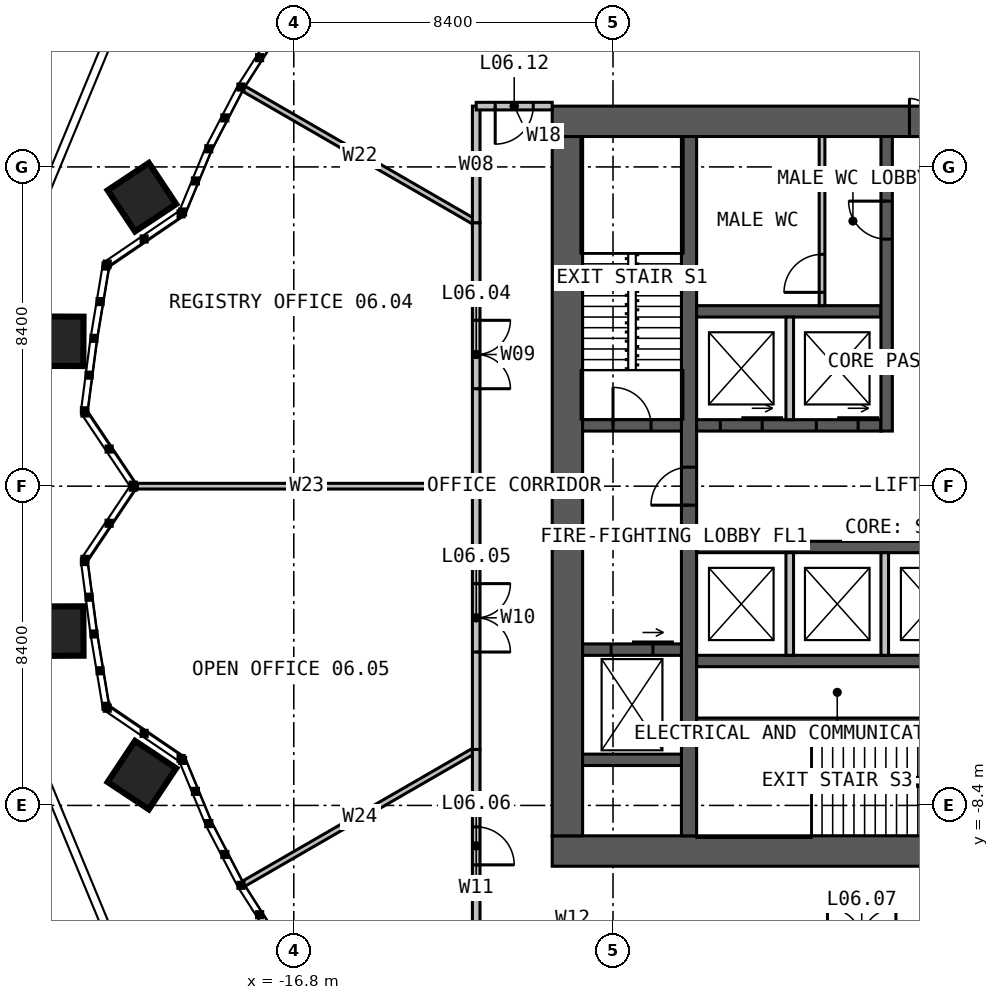
"""IFC4 building model, lengths in metres.
Left out: names, types, materials, properties, quantities, classifications, styles, units other than length and angle.
Written with IfcOpenShell. Run it as: python <this file> out.ifc"""

import sys

from ifc_helpers import new_model, si_unit, direction, frame, frame_2d, origin, place, context, subcontext, project, spatial, rectangle, extrude, element, fill, save


model = new_model("IFC4")
c1 = context("Model", 3, precision=1e-05, world=origin(), true_north=direction((0.0, 1.0)))
c2 = subcontext(c1, "Body", "Model", "MODEL_VIEW")
j1 = project(units=[si_unit("LENGTHUNIT", "METRE"), si_unit("PLANEANGLEUNIT", "RADIAN")], contexts=[c1])
p1 = place(None, origin())
s1 = spatial("IfcSite", under=j1, at=p1, CompositionType="ELEMENT")
p2 = place(p1, origin())
s2 = spatial("IfcBuilding", under=s1, at=p2, CompositionType="ELEMENT")
p3 = place(p2, frame((0.0, 0.0, 29.0)))
s3 = spatial("IfcBuildingStorey", under=s2, at=p3, CompositionType="ELEMENT", Elevation=29.0)
p4 = place(p3, frame((-10.0, 9.6, 0.0), z_axis=(0.0, 0.0, 1.0), x_axis=(1.0, 0.0, 0.0)))
e1 = element("IfcWall", 1, at=p4, inside=s3, PredefinedType="SOLIDWALL", context=c2, shape_type="SweptSolid", body=[
    extrude(rectangle(XDim=20.0, YDim=0.8, at=frame_2d((10.0, 0.0))), origin(), (0.0, 0.0, 1.0), 4.0),
])
p5 = place(p4, frame((9.4, 0.0, 0.0)))
e2 = element("IfcOpeningElement", 2, at=p5, cuts=e1, PredefinedType="OPENING", context=c2, shape_type="SweptSolid", body=[
    extrude(rectangle(XDim=1.2, YDim=2.2, at=frame_2d((0.6, 1.1))), frame((0.0, 0.41, 0.0), z_axis=(0.0, -1.0, 0.0), x_axis=(1.0, 0.0, 0.0)), (0.0, 0.0, 1.0), 0.82),
])
p6 = place(p3, frame((10.0, -9.6, 0.0), z_axis=(0.0, 0.0, 1.0), x_axis=(-1.0, 0.0, 0.0)))
e3 = element("IfcWall", 3, at=p6, inside=s3, PredefinedType="SOLIDWALL", context=c2, shape_type="SweptSolid", body=[
    extrude(rectangle(XDim=20.0, YDim=0.8, at=frame_2d((10.0, 0.0))), origin(), (0.0, 0.0, 1.0), 4.0),
])
p7 = place(p6, frame((6.875, 0.0, 0.0)))
e4 = element("IfcOpeningElement", 4, at=p7, cuts=e3, PredefinedType="OPENING", context=c2, shape_type="SweptSolid", body=[
    extrude(rectangle(XDim=1.2, YDim=2.2, at=frame_2d((0.6, 1.1))), frame((0.0, 0.41, 0.0), z_axis=(0.0, -1.0, 0.0), x_axis=(1.0, 0.0, 0.0)), (0.0, 0.0, 1.0), 0.82),
])
p8 = place(p3, frame((-9.6, 9.2, 0.0), z_axis=(0.0, 0.0, 1.0), x_axis=(0.0, -1.0, 0.0)))
e5 = element("IfcWall", 5, at=p8, inside=s3, PredefinedType="SOLIDWALL", context=c2, shape_type="SweptSolid", body=[
    extrude(rectangle(XDim=18.4, YDim=0.8, at=frame_2d((9.2, 0.0))), origin(), (0.0, 0.0, 1.0), 4.0),
])
p9 = place(p3, frame((-6.4, -9.2, 0.0), z_axis=(0.0, 0.0, 1.0), x_axis=(0.0, 1.0, 0.0)))
e6 = element("IfcWall", 6, at=p9, inside=s3, PredefinedType="SOLIDWALL", context=c2, shape_type="SweptSolid", body=[
    extrude(rectangle(XDim=18.4, YDim=0.4, at=frame_2d((9.2, 0.0))), origin(), (0.0, 0.0, 1.0), 4.0),
])
p10 = place(p9, frame((8.7, 0.0, 0.0)))
e7 = element("IfcOpeningElement", 7, at=p10, cuts=e6, PredefinedType="OPENING", context=c2, shape_type="SweptSolid", body=[
    extrude(rectangle(XDim=1.0, YDim=2.2, at=frame_2d((0.5, 1.1))), frame((0.0, 0.21, 0.0), z_axis=(0.0, -1.0, 0.0), x_axis=(1.0, 0.0, 0.0)), (0.0, 0.0, 1.0), 0.42),
])
p11 = place(p3, frame((-6.2, 1.6, 0.0), z_axis=(0.0, 0.0, 1.0), x_axis=(1.0, 0.0, 0.0)))
e8 = element("IfcWall", 8, at=p11, inside=s3, PredefinedType="SOLIDWALL", context=c2, shape_type="SweptSolid", body=[
    extrude(rectangle(XDim=4.85, YDim=0.3, at=frame_2d((2.425, 0.0))), origin(), (0.0, 0.0, 1.0), 4.0),
])
p12 = place(p11, frame((0.625, 0.0, 0.0)))
e9 = element("IfcOpeningElement", 9, at=p12, cuts=e8, PredefinedType="OPENING", context=c2, shape_type="SweptSolid", body=[
    extrude(rectangle(XDim=1.1, YDim=2.2, at=frame_2d((0.55, 1.1))), frame((0.0, 0.16, 0.0), z_axis=(0.0, -1.0, 0.0), x_axis=(1.0, 0.0, 0.0)), (0.0, 0.0, 1.0), 0.32),
])
p13 = place(p11, frame((3.15, 0.0, 0.0)))
e10 = element("IfcOpeningElement", 10, at=p13, cuts=e8, PredefinedType="OPENING", context=c2, shape_type="SweptSolid", body=[
    extrude(rectangle(XDim=1.1, YDim=2.2, at=frame_2d((0.55, 1.1))), frame((0.0, 0.16, 0.0), z_axis=(0.0, -1.0, 0.0), x_axis=(1.0, 0.0, 0.0)), (0.0, 0.0, 1.0), 0.32),
])
p14 = place(p3, frame((-6.2, 4.6, 0.0), z_axis=(0.0, 0.0, 1.0), x_axis=(1.0, 0.0, 0.0)))
e11 = element("IfcWall", 11, at=p14, inside=s3, PredefinedType="SOLIDWALL", context=c2, shape_type="SweptSolid", body=[
    extrude(rectangle(XDim=4.85, YDim=0.3, at=frame_2d((2.425, 0.0))), origin(), (0.0, 0.0, 1.0), 4.0),
])
p15 = place(p3, frame((-1.2, 1.45, 0.0), z_axis=(0.0, 0.0, 1.0), x_axis=(0.0, 1.0, 0.0)))
e12 = element("IfcWall", 12, at=p15, inside=s3, PredefinedType="SOLIDWALL", context=c2, shape_type="SweptSolid", body=[
    extrude(rectangle(XDim=7.75, YDim=0.3, at=frame_2d((3.875, 0.0))), origin(), (0.0, 0.0, 1.0), 4.0),
])
p16 = place(p15, frame((5.05, 0.0, 0.0)))
e13 = element("IfcOpeningElement", 13, at=p16, cuts=e12, PredefinedType="OPENING", context=c2, shape_type="SweptSolid", body=[
    extrude(rectangle(XDim=1.0, YDim=2.2, at=frame_2d((0.5, 1.1))), frame((0.0, 0.16, 0.0), z_axis=(0.0, -1.0, 0.0), x_axis=(1.0, 0.0, 0.0)), (0.0, 0.0, 1.0), 0.32),
])
for number, where, z_axis, x_axis in (
    (14, (-6.2, -1.6, 0.0), (0.0, 0.0, 1.0), (1.0, 0.0, 0.0)),
    (15, (-6.2, -4.6, 0.0), (0.0, 0.0, 1.0), (1.0, 0.0, 0.0)),
):
    element("IfcWall", number, at=place(p3, frame(where, z_axis=z_axis, x_axis=x_axis)), inside=s3, PredefinedType="SOLIDWALL", context=c2, shape_type="SweptSolid", body=[
        extrude(rectangle(XDim=7.4, YDim=0.3, at=frame_2d((3.7, 0.0))), origin(), (0.0, 0.0, 1.0), 4.0),
    ])
p17 = place(p3, frame((-6.2, -6.2, 0.0), z_axis=(0.0, 0.0, 1.0), x_axis=(1.0, 0.0, 0.0)))
e16 = element("IfcWall", 16, at=p17, inside=s3, PredefinedType="SOLIDWALL", context=c2, shape_type="SweptSolid", body=[
    extrude(rectangle(XDim=7.4, YDim=0.2, at=frame_2d((3.7, 0.0))), origin(), (0.0, 0.0, 1.0), 4.0),
])
p18 = place(p3, frame((-9.2, 1.6, 0.0), z_axis=(0.0, 0.0, 1.0), x_axis=(1.0, 0.0, 0.0)))
e17 = element("IfcWall", 17, at=p18, inside=s3, PredefinedType="SOLIDWALL", context=c2, shape_type="SweptSolid", body=[
    extrude(rectangle(XDim=2.6, YDim=0.3, at=frame_2d((1.3, 0.0))), origin(), (0.0, 0.0, 1.0), 4.0),
])
p19 = place(p18, frame((0.8, 0.0, 0.0)))
e18 = element("IfcOpeningElement", 18, at=p19, cuts=e17, PredefinedType="OPENING", context=c2, shape_type="SweptSolid", body=[
    extrude(rectangle(XDim=1.0, YDim=2.2, at=frame_2d((0.5, 1.1))), frame((0.0, 0.16, 0.0), z_axis=(0.0, -1.0, 0.0), x_axis=(1.0, 0.0, 0.0)), (0.0, 0.0, 1.0), 0.32),
])
p20 = place(p3, frame((-9.2, -4.3, 0.0), z_axis=(0.0, 0.0, 1.0), x_axis=(1.0, 0.0, 0.0)))
e19 = element("IfcWall", 19, at=p20, inside=s3, PredefinedType="SOLIDWALL", context=c2, shape_type="SweptSolid", body=[
    extrude(rectangle(XDim=2.6, YDim=0.3, at=frame_2d((1.3, 0.0))), origin(), (0.0, 0.0, 1.0), 4.0),
])
p21 = place(p20, frame((0.75, 0.0, 0.0)))
e20 = element("IfcOpeningElement", 20, at=p21, cuts=e19, PredefinedType="OPENING", context=c2, shape_type="SweptSolid", body=[
    extrude(rectangle(XDim=1.1, YDim=2.2, at=frame_2d((0.55, 1.1))), frame((0.0, 0.16, 0.0), z_axis=(0.0, -1.0, 0.0), x_axis=(1.0, 0.0, 0.0)), (0.0, 0.0, 1.0), 0.32),
])
p22 = place(p3, frame((-9.2, -7.2, 0.0), z_axis=(0.0, 0.0, 1.0), x_axis=(1.0, 0.0, 0.0)))
e21 = element("IfcWall", 21, at=p22, inside=s3, PredefinedType="SOLIDWALL", context=c2, shape_type="SweptSolid", body=[
    extrude(rectangle(XDim=2.6, YDim=0.3, at=frame_2d((1.3, 0.0))), origin(), (0.0, 0.0, 1.0), 4.0),
])
for number, where, z_axis, x_axis in (
    (22, (-3.75, 1.75, 0.0), (0.0, 0.0, 1.0), (0.0, 1.0, 0.0)),
    (23, (-3.75, -1.75, 0.0), (0.0, 0.0, 1.0), (0.0, -1.0, 0.0)),
    (24, (-1.25, -1.75, 0.0), (0.0, 0.0, 1.0), (0.0, -1.0, 0.0)),
):
    element("IfcWall", number, at=place(p3, frame(where, z_axis=z_axis, x_axis=x_axis)), inside=s3, PredefinedType="SOLIDWALL", context=c2, shape_type="SweptSolid", body=[
        extrude(rectangle(XDim=2.7, YDim=0.2, at=frame_2d((1.35, 0.0))), origin(), (0.0, 0.0, 1.0), 3.75),
    ])
p23 = place(p3, frame((-2.9, 4.75, 0.0), z_axis=(0.0, 0.0, 1.0), x_axis=(0.0, 1.0, 0.0)))
e25 = element("IfcWall", 25, at=p23, inside=s3, PredefinedType="PARTITIONING", context=c2, shape_type="SweptSolid", body=[
    extrude(rectangle(XDim=4.45, YDim=0.15, at=frame_2d((2.225, 0.0))), origin(), (0.0, 0.0, 1.0), 3.75),
])
p24 = place(p23, frame((0.35, 0.0, 0.0)))
e26 = element("IfcOpeningElement", 26, at=p24, cuts=e25, PredefinedType="OPENING", context=c2, shape_type="SweptSolid", body=[
    extrude(rectangle(XDim=1.0, YDim=2.2, at=frame_2d((0.5, 1.1))), frame((0.0, 0.085, 0.0), z_axis=(0.0, -1.0, 0.0), x_axis=(1.0, 0.0, 0.0)), (0.0, 0.0, 1.0), 0.17),
])
p25 = place(p3, frame((-12.0, 6.928, 0.0), z_axis=(0.0, 0.0, 1.0), x_axis=(-0.86602254688, 0.500004948271, 0.0)))
e27 = element("IfcWall", 27, at=p25, inside=s3, PredefinedType="PARTITIONING", context=c2, shape_type="SweptSolid", body=[
    extrude(rectangle(XDim=7.057, YDim=0.15, at=frame_2d((3.529, 0.0))), origin(), (0.0, 0.0, 1.0), 2.79),
])
p26 = place(p3, frame((-12.0, 0.0, 0.0), z_axis=(0.0, 0.0, 1.0), x_axis=(-1.0, 0.0, 0.0)))
e28 = element("IfcWall", 28, at=p26, inside=s3, PredefinedType="PARTITIONING", context=c2, shape_type="SweptSolid", body=[
    extrude(rectangle(XDim=8.914, YDim=0.15, at=frame_2d((4.457, 0.0))), origin(), (0.0, 0.0, 1.0), 2.79),
])
p27 = place(p3, frame((-12.0, -6.928, 0.0), z_axis=(0.0, 0.0, 1.0), x_axis=(-0.86602254688, -0.500004948271, 0.0)))
e29 = element("IfcWall", 29, at=p27, inside=s3, PredefinedType="PARTITIONING", context=c2, shape_type="SweptSolid", body=[
    extrude(rectangle(XDim=7.057, YDim=0.15, at=frame_2d((3.529, 0.0))), origin(), (0.0, 0.0, 1.0), 2.79),
])
p28 = place(p3, frame((-12.0, 10.0, 0.0), z_axis=(0.0, 0.0, 1.0), x_axis=(0.0, -1.0, 0.0)))
e30 = element("IfcWall", 30, at=p28, inside=s3, PredefinedType="PARTITIONING", context=c2, shape_type="SweptSolid", body=[
    extrude(rectangle(XDim=3.072, YDim=0.2, at=frame_2d((1.536, 0.0))), origin(), (0.0, 0.0, 1.0), 3.8),
])
p29 = place(p3, frame((-12.0, 6.928, 0.0), z_axis=(0.0, 0.0, 1.0), x_axis=(0.0, -1.0, 0.0)))
e31 = element("IfcWall", 31, at=p29, inside=s3, PredefinedType="PARTITIONING", context=c2, shape_type="SweptSolid", body=[
    extrude(rectangle(XDim=6.928, YDim=0.2, at=frame_2d((3.464, 0.0))), origin(), (0.0, 0.0, 1.0), 3.8),
])
p30 = place(p29, frame((2.564, 0.0, 0.0)))
e32 = element("IfcOpeningElement", 32, at=p30, cuts=e31, PredefinedType="OPENING", context=c2, shape_type="SweptSolid", body=[
    extrude(rectangle(XDim=1.8, YDim=2.2, at=frame_2d((0.9, 1.1))), frame((0.0, 0.11, 0.0), z_axis=(0.0, -1.0, 0.0), x_axis=(1.0, 0.0, 0.0)), (0.0, 0.0, 1.0), 0.22),
])
p31 = place(p3, frame((-12.0, 0.0, 0.0), z_axis=(0.0, 0.0, 1.0), x_axis=(0.0, -1.0, 0.0)))
e33 = element("IfcWall", 33, at=p31, inside=s3, PredefinedType="PARTITIONING", context=c2, shape_type="SweptSolid", body=[
    extrude(rectangle(XDim=6.928, YDim=0.2, at=frame_2d((3.464, 0.0))), origin(), (0.0, 0.0, 1.0), 3.8),
])
p32 = place(p31, frame((2.564, 0.0, 0.0)))
e34 = element("IfcOpeningElement", 34, at=p32, cuts=e33, PredefinedType="OPENING", context=c2, shape_type="SweptSolid", body=[
    extrude(rectangle(XDim=1.8, YDim=2.2, at=frame_2d((0.9, 1.1))), frame((0.0, 0.11, 0.0), z_axis=(0.0, -1.0, 0.0), x_axis=(1.0, 0.0, 0.0)), (0.0, 0.0, 1.0), 0.22),
])
p33 = place(p3, frame((-12.0, -6.928, 0.0), z_axis=(0.0, 0.0, 1.0), x_axis=(0.0, -1.0, 0.0)))
e35 = element("IfcWall", 35, at=p33, inside=s3, PredefinedType="PARTITIONING", context=c2, shape_type="SweptSolid", body=[
    extrude(rectangle(XDim=5.072, YDim=0.2, at=frame_2d((2.536, 0.0))), origin(), (0.0, 0.0, 1.0), 3.8),
])
p34 = place(p33, frame((2.036, 0.0, 0.0)))
e36 = element("IfcOpeningElement", 36, at=p34, cuts=e35, PredefinedType="OPENING", context=c2, shape_type="SweptSolid", body=[
    extrude(rectangle(XDim=1.0, YDim=2.2, at=frame_2d((0.5, 1.1))), frame((0.0, 0.11, 0.0), z_axis=(0.0, -1.0, 0.0), x_axis=(1.0, 0.0, 0.0)), (0.0, 0.0, 1.0), 0.22),
])
p35 = place(p3, frame((-10.0, 10.0, 0.0), z_axis=(0.0, 0.0, 1.0), x_axis=(-1.0, 0.0, 0.0)))
e37 = element("IfcWall", 37, at=p35, inside=s3, PredefinedType="PARTITIONING", context=c2, shape_type="SweptSolid", body=[
    extrude(rectangle(XDim=2.0, YDim=0.2, at=frame_2d((1.0, 0.0))), origin(), (0.0, 0.0, 1.0), 3.8),
])
p36 = place(p35, frame((0.5, 0.0, 0.0)))
e38 = element("IfcOpeningElement", 38, at=p36, cuts=e37, PredefinedType="OPENING", context=c2, shape_type="SweptSolid", body=[
    extrude(rectangle(XDim=1.0, YDim=2.2, at=frame_2d((0.5, 1.1))), frame((0.0, 0.11, 0.0), z_axis=(0.0, -1.0, 0.0), x_axis=(1.0, 0.0, 0.0)), (0.0, 0.0, 1.0), 0.22),
])
p37 = place(p5, origin())
e39 = element("IfcDoor", 39, at=p37, inside=s3, OperationType="DOUBLE_DOOR_SINGLE_SWING", PredefinedType="DOOR", context=c2, shape_type="SweptSolid", body=[
    extrude(rectangle(XDim=1.2, YDim=2.2, at=frame_2d((0.6, 1.1))), frame((0.0, 0.025, 0.0), z_axis=(0.0, -1.0, 0.0), x_axis=(1.0, 0.0, 0.0)), (0.0, 0.0, 1.0), 0.05),
])
fill(e2, e39)
p38 = place(p10, origin())
e40 = element("IfcDoor", 40, at=p38, inside=s3, OperationType="SINGLE_SWING_LEFT", PredefinedType="DOOR", context=c2, shape_type="SweptSolid", body=[
    extrude(rectangle(XDim=1.0, YDim=2.2, at=frame_2d((0.5, 1.1))), frame((0.0, 0.025, 0.0), z_axis=(0.0, -1.0, 0.0), x_axis=(1.0, 0.0, 0.0)), (0.0, 0.0, 1.0), 0.05),
])
fill(e7, e40)
p39 = place(p19, origin())
e41 = element("IfcDoor", 41, at=p39, inside=s3, OperationType="SINGLE_SWING_LEFT", PredefinedType="DOOR", context=c2, shape_type="SweptSolid", body=[
    extrude(rectangle(XDim=1.0, YDim=2.2, at=frame_2d((0.5, 1.1))), frame((0.0, 0.025, 0.0), z_axis=(0.0, -1.0, 0.0), x_axis=(1.0, 0.0, 0.0)), (0.0, 0.0, 1.0), 0.05),
])
fill(e18, e41)
p40 = place(p16, origin())
e42 = element("IfcDoor", 42, at=p40, inside=s3, OperationType="SINGLE_SWING_RIGHT", PredefinedType="DOOR", context=c2, shape_type="SweptSolid", body=[
    extrude(rectangle(XDim=1.0, YDim=2.2, at=frame_2d((0.5, 1.1))), frame((0.0, 0.025, 0.0), z_axis=(0.0, -1.0, 0.0), x_axis=(1.0, 0.0, 0.0)), (0.0, 0.0, 1.0), 0.05),
])
fill(e13, e42)
p41 = place(p24, origin())
e43 = element("IfcDoor", 43, at=p41, inside=s3, OperationType="SINGLE_SWING_LEFT", PredefinedType="DOOR", context=c2, shape_type="SweptSolid", body=[
    extrude(rectangle(XDim=1.0, YDim=2.2, at=frame_2d((0.5, 1.1))), frame((0.0, 0.025, 0.0), z_axis=(0.0, -1.0, 0.0), x_axis=(1.0, 0.0, 0.0)), (0.0, 0.0, 1.0), 0.05),
])
fill(e26, e43)
p42 = place(p12, origin())
e44 = element("IfcDoor", 44, at=p42, inside=s3, OperationType="SLIDING_TO_LEFT", PredefinedType="DOOR", context=c2, shape_type="SweptSolid", body=[
    extrude(rectangle(XDim=1.1, YDim=2.2, at=frame_2d((0.55, 1.1))), frame((0.0, 0.025, 0.0), z_axis=(0.0, -1.0, 0.0), x_axis=(1.0, 0.0, 0.0)), (0.0, 0.0, 1.0), 0.05),
])
fill(e9, e44)
p43 = place(p13, origin())
e45 = element("IfcDoor", 45, at=p43, inside=s3, OperationType="SLIDING_TO_LEFT", PredefinedType="DOOR", context=c2, shape_type="SweptSolid", body=[
    extrude(rectangle(XDim=1.1, YDim=2.2, at=frame_2d((0.55, 1.1))), frame((0.0, 0.025, 0.0), z_axis=(0.0, -1.0, 0.0), x_axis=(1.0, 0.0, 0.0)), (0.0, 0.0, 1.0), 0.05),
])
fill(e10, e45)
p44 = place(p21, origin())
e46 = element("IfcDoor", 46, at=p44, inside=s3, OperationType="SLIDING_TO_LEFT", PredefinedType="DOOR", context=c2, shape_type="SweptSolid", body=[
    extrude(rectangle(XDim=1.1, YDim=2.2, at=frame_2d((0.55, 1.1))), frame((0.0, 0.025, 0.0), z_axis=(0.0, -1.0, 0.0), x_axis=(1.0, 0.0, 0.0)), (0.0, 0.0, 1.0), 0.05),
])
fill(e20, e46)
p45 = place(p30, origin())
e47 = element("IfcDoor", 47, at=p45, inside=s3, OperationType="DOUBLE_DOOR_SINGLE_SWING", PredefinedType="DOOR", context=c2, shape_type="SweptSolid", body=[
    extrude(rectangle(XDim=1.8, YDim=2.2, at=frame_2d((0.9, 1.1))), frame((0.0, 0.025, 0.0), z_axis=(0.0, -1.0, 0.0), x_axis=(1.0, 0.0, 0.0)), (0.0, 0.0, 1.0), 0.05),
])
fill(e32, e47)
p46 = place(p32, origin())
e48 = element("IfcDoor", 48, at=p46, inside=s3, OperationType="DOUBLE_DOOR_SINGLE_SWING", PredefinedType="DOOR", context=c2, shape_type="SweptSolid", body=[
    extrude(rectangle(XDim=1.8, YDim=2.2, at=frame_2d((0.9, 1.1))), frame((0.0, 0.025, 0.0), z_axis=(0.0, -1.0, 0.0), x_axis=(1.0, 0.0, 0.0)), (0.0, 0.0, 1.0), 0.05),
])
fill(e34, e48)
p47 = place(p34, origin())
e49 = element("IfcDoor", 49, at=p47, inside=s3, OperationType="SINGLE_SWING_RIGHT", PredefinedType="DOOR", context=c2, shape_type="SweptSolid", body=[
    extrude(rectangle(XDim=1.0, YDim=2.2, at=frame_2d((0.5, 1.1))), frame((0.0, 0.025, 0.0), z_axis=(0.0, -1.0, 0.0), x_axis=(1.0, 0.0, 0.0)), (0.0, 0.0, 1.0), 0.05),
])
fill(e36, e49)
p48 = place(p36, origin())
e50 = element("IfcDoor", 50, at=p48, inside=s3, OperationType="SINGLE_SWING_RIGHT", PredefinedType="DOOR", context=c2, shape_type="SweptSolid", body=[
    extrude(rectangle(XDim=1.0, YDim=2.2, at=frame_2d((0.5, 1.1))), frame((0.0, 0.025, 0.0), z_axis=(0.0, -1.0, 0.0), x_axis=(1.0, 0.0, 0.0)), (0.0, 0.0, 1.0), 0.05),
])
fill(e38, e50)
save(model, sys.argv[1])
